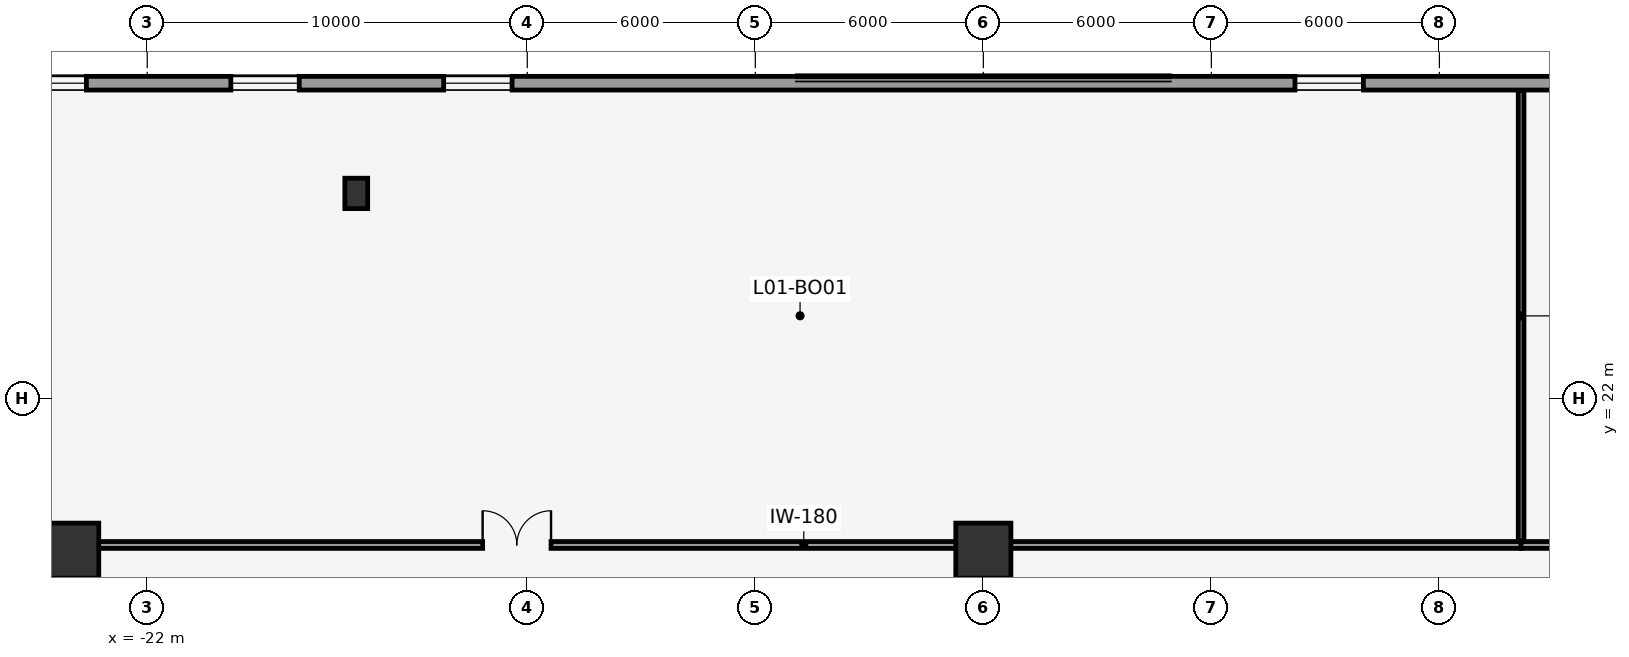
"""IFC4 building model, lengths in metres.
Left out: names, types, materials, properties, quantities, classifications, styles, units other than length and angle.
Written with IfcOpenShell. Run it as: python <this file> out.ifc"""

import sys

from ifc_helpers import new_model, si_unit, direction, frame, frame_2d, origin, origin_2d, place, context, subcontext, project, spatial, rectangle, hollow_rectangle, extrude, element, fill, save


model = new_model("IFC4")
c1 = context("Model", 3, precision=1e-05, world=origin(), true_north=direction((0.0, 1.0)))
c2 = subcontext(c1, "Body", "Model", "MODEL_VIEW")
j1 = project(units=[si_unit("LENGTHUNIT", "METRE"), si_unit("PLANEANGLEUNIT", "RADIAN")], contexts=[c1])
p1 = place(None, origin())
s1 = spatial("IfcSite", under=j1, at=p1, CompositionType="ELEMENT")
p2 = place(p1, origin())
s2 = spatial("IfcBuilding", under=s1, at=p2, CompositionType="ELEMENT")
p3 = place(p2, frame((0.0, 0.0, 6.0)))
s3 = spatial("IfcBuildingStorey", under=s2, at=p3, CompositionType="ELEMENT", Elevation=6.0)
for number, where, z_axis, x_axis in (
    (1, (-24.0, 18.0, 0.0), (0.0, 0.0, 1.0), (1.0, 0.0, 0.0)),
    (2, (0.0, 18.0, 0.0), (0.0, 0.0, 1.0), (1.0, 0.0, 0.0)),
):
    element("IfcColumn", number, at=place(p3, frame(where, z_axis=z_axis, x_axis=x_axis)), inside=s3, PredefinedType="COLUMN", context=c2, shape_type="SweptSolid", body=[
        extrude(rectangle(XDim=1.45, YDim=1.45, at=origin_2d()), origin(), (0.0, 0.0, 1.0), 5.5),
    ])
p4 = place(p3, frame((-16.5, 27.4, 0.0), z_axis=(0.0, 0.0, 1.0), x_axis=(1.0, 0.0, 0.0)))
e3 = element("IfcColumn", 3, at=p4, inside=s3, PredefinedType="COLUMN", context=c2, shape_type="SweptSolid", body=[
    extrude(hollow_rectangle(XDim=0.6, YDim=0.8, WallThickness=0.05, at=origin_2d()), origin(), (0.0, 0.0, 1.0), 5.5),
])
p5 = place(p3, frame((-41.3, 30.3, 0.0), z_axis=(0.0, 0.0, 1.0), x_axis=(1.0, 0.0, 0.0)))
e4 = element("IfcWall", 4, at=p5, inside=s3, PredefinedType="STANDARD", context=c2, shape_type="SweptSolid", body=[
    extrude(rectangle(XDim=82.6, YDim=0.36, at=frame_2d((41.3, 0.0))), origin(), (0.0, 0.0, 1.0), 5.2),
])
p6 = place(p5, frame((4.7, 0.0, 0.9)))
e5 = element("IfcOpeningElement", 5, at=p6, cuts=e4, PredefinedType="OPENING", context=c2, shape_type="SweptSolid", body=[
    extrude(rectangle(XDim=1.8, YDim=2.6, at=frame_2d((0.9, 1.3))), frame((0.0, 0.19, 0.0), z_axis=(0.0, -1.0, 0.0), x_axis=(1.0, 0.0, 0.0)), (0.0, 0.0, 1.0), 0.38),
])
p7 = place(p5, frame((10.3, 0.0, 0.9)))
e6 = element("IfcOpeningElement", 6, at=p7, cuts=e4, PredefinedType="OPENING", context=c2, shape_type="SweptSolid", body=[
    extrude(rectangle(XDim=1.8, YDim=2.6, at=frame_2d((0.9, 1.3))), frame((0.0, 0.19, 0.0), z_axis=(0.0, -1.0, 0.0), x_axis=(1.0, 0.0, 0.0)), (0.0, 0.0, 1.0), 0.38),
])
p8 = place(p5, frame((15.9, 0.0, 0.9)))
e7 = element("IfcOpeningElement", 7, at=p8, cuts=e4, PredefinedType="OPENING", context=c2, shape_type="SweptSolid", body=[
    extrude(rectangle(XDim=1.8, YDim=2.6, at=frame_2d((0.9, 1.3))), frame((0.0, 0.19, 0.0), z_axis=(0.0, -1.0, 0.0), x_axis=(1.0, 0.0, 0.0)), (0.0, 0.0, 1.0), 0.38),
])
p9 = place(p5, frame((21.5, 0.0, 0.9)))
e8 = element("IfcOpeningElement", 8, at=p9, cuts=e4, PredefinedType="OPENING", context=c2, shape_type="SweptSolid", body=[
    extrude(rectangle(XDim=1.8, YDim=2.6, at=frame_2d((0.9, 1.3))), frame((0.0, 0.19, 0.0), z_axis=(0.0, -1.0, 0.0), x_axis=(1.0, 0.0, 0.0)), (0.0, 0.0, 1.0), 0.38),
])
p10 = place(p5, frame((27.1, 0.0, 0.9)))
e9 = element("IfcOpeningElement", 9, at=p10, cuts=e4, PredefinedType="OPENING", context=c2, shape_type="SweptSolid", body=[
    extrude(rectangle(XDim=1.8, YDim=2.6, at=frame_2d((0.9, 1.3))), frame((0.0, 0.19, 0.0), z_axis=(0.0, -1.0, 0.0), x_axis=(1.0, 0.0, 0.0)), (0.0, 0.0, 1.0), 0.38),
])
p11 = place(p5, frame((49.5, 0.0, 0.9)))
e10 = element("IfcOpeningElement", 10, at=p11, cuts=e4, PredefinedType="OPENING", context=c2, shape_type="SweptSolid", body=[
    extrude(rectangle(XDim=1.8, YDim=2.6, at=frame_2d((0.9, 1.3))), frame((0.0, 0.19, 0.0), z_axis=(0.0, -1.0, 0.0), x_axis=(1.0, 0.0, 0.0)), (0.0, 0.0, 1.0), 0.38),
])
p12 = place(p5, frame((60.7, 0.0, 0.9)))
e11 = element("IfcOpeningElement", 11, at=p12, cuts=e4, PredefinedType="OPENING", context=c2, shape_type="SweptSolid", body=[
    extrude(rectangle(XDim=1.8, YDim=2.6, at=frame_2d((0.9, 1.3))), frame((0.0, 0.19, 0.0), z_axis=(0.0, -1.0, 0.0), x_axis=(1.0, 0.0, 0.0)), (0.0, 0.0, 1.0), 0.38),
])
p13 = place(p5, frame((66.3, 0.0, 0.9)))
e12 = element("IfcOpeningElement", 12, at=p13, cuts=e4, PredefinedType="OPENING", context=c2, shape_type="SweptSolid", body=[
    extrude(rectangle(XDim=1.8, YDim=2.6, at=frame_2d((0.9, 1.3))), frame((0.0, 0.19, 0.0), z_axis=(0.0, -1.0, 0.0), x_axis=(1.0, 0.0, 0.0)), (0.0, 0.0, 1.0), 0.38),
])
p14 = place(p5, frame((71.9, 0.0, 0.9)))
e13 = element("IfcOpeningElement", 13, at=p14, cuts=e4, PredefinedType="OPENING", context=c2, shape_type="SweptSolid", body=[
    extrude(rectangle(XDim=1.8, YDim=2.6, at=frame_2d((0.9, 1.3))), frame((0.0, 0.19, 0.0), z_axis=(0.0, -1.0, 0.0), x_axis=(1.0, 0.0, 0.0)), (0.0, 0.0, 1.0), 0.38),
])
p15 = place(p3, frame((-23.6, 18.15, 0.0), z_axis=(0.0, 0.0, 1.0), x_axis=(1.0, 0.0, 0.0)))
e14 = element("IfcWall", 14, at=p15, inside=s3, PredefinedType="PARTITIONING", context=c2, shape_type="SweptSolid", body=[
    extrude(rectangle(XDim=37.75, YDim=0.18, at=frame_2d((18.875, 0.0))), origin(), (0.0, 0.0, 1.0), 3.38),
])
p16 = place(p15, frame((10.425, 0.0, 0.0)))
e15 = element("IfcOpeningElement", 15, at=p16, cuts=e14, PredefinedType="OPENING", context=c2, shape_type="SweptSolid", body=[
    extrude(rectangle(XDim=1.8, YDim=2.2, at=frame_2d((0.9, 1.1))), frame((0.0, 0.1, 0.0), z_axis=(0.0, -1.0, 0.0), x_axis=(1.0, 0.0, 0.0)), (0.0, 0.0, 1.0), 0.2),
])
p17 = place(p3, frame((14.15, 18.15, 0.0), z_axis=(0.0, 0.0, 1.0), x_axis=(1.0, 0.0, 0.0)))
e16 = element("IfcWall", 16, at=p17, inside=s3, PredefinedType="PARTITIONING", context=c2, shape_type="SweptSolid", body=[
    extrude(rectangle(XDim=9.5, YDim=0.18, at=frame_2d((4.75, 0.0))), origin(), (0.0, 0.0, 1.0), 3.38),
])
p18 = place(p17, frame((4.275, 0.0, 0.0)))
e17 = element("IfcOpeningElement", 17, at=p18, cuts=e16, PredefinedType="OPENING", context=c2, shape_type="SweptSolid", body=[
    extrude(rectangle(XDim=0.95, YDim=2.15, at=frame_2d((0.475, 1.075))), frame((0.0, 0.1, 0.0), z_axis=(0.0, -1.0, 0.0), x_axis=(1.0, 0.0, 0.0)), (0.0, 0.0, 1.0), 0.2),
])
p19 = place(p3, frame((14.15, 18.25, 0.0), z_axis=(0.0, 0.0, 1.0), x_axis=(0.0, 1.0, 0.0)))
e18 = element("IfcWall", 18, at=p19, inside=s3, PredefinedType="PARTITIONING", context=c2, shape_type="SweptSolid", body=[
    extrude(rectangle(XDim=11.855, YDim=0.15, at=frame_2d((5.927, 0.0))), origin(), (0.0, 0.0, 1.0), 5.2),
])
p20 = place(p8, origin())
e19 = element("IfcWindow", 19, at=p20, inside=s3, PartitioningType="DOUBLE_PANEL_VERTICAL", PredefinedType="WINDOW", context=c2, shape_type="SweptSolid", body=[
    extrude(rectangle(XDim=1.8, YDim=2.6, at=frame_2d((0.9, 1.3))), frame((0.0, 0.03, 0.0), z_axis=(0.0, -1.0, 0.0), x_axis=(1.0, 0.0, 0.0)), (0.0, 0.0, 1.0), 0.06),
])
fill(e7, e19)
p21 = place(p9, origin())
e20 = element("IfcWindow", 20, at=p21, inside=s3, PartitioningType="DOUBLE_PANEL_VERTICAL", PredefinedType="WINDOW", context=c2, shape_type="SweptSolid", body=[
    extrude(rectangle(XDim=1.8, YDim=2.6, at=frame_2d((0.9, 1.3))), frame((0.0, 0.03, 0.0), z_axis=(0.0, -1.0, 0.0), x_axis=(1.0, 0.0, 0.0)), (0.0, 0.0, 1.0), 0.06),
])
fill(e8, e20)
p22 = place(p10, origin())
e21 = element("IfcWindow", 21, at=p22, inside=s3, PartitioningType="DOUBLE_PANEL_VERTICAL", PredefinedType="WINDOW", context=c2, shape_type="SweptSolid", body=[
    extrude(rectangle(XDim=1.8, YDim=2.6, at=frame_2d((0.9, 1.3))), frame((0.0, 0.03, 0.0), z_axis=(0.0, -1.0, 0.0), x_axis=(1.0, 0.0, 0.0)), (0.0, 0.0, 1.0), 0.06),
])
fill(e9, e21)
p23 = place(p11, origin())
e22 = element("IfcWindow", 22, at=p23, inside=s3, PartitioningType="DOUBLE_PANEL_VERTICAL", PredefinedType="WINDOW", context=c2, shape_type="SweptSolid", body=[
    extrude(rectangle(XDim=1.8, YDim=2.6, at=frame_2d((0.9, 1.3))), frame((0.0, 0.03, 0.0), z_axis=(0.0, -1.0, 0.0), x_axis=(1.0, 0.0, 0.0)), (0.0, 0.0, 1.0), 0.06),
])
fill(e10, e22)
p24 = place(p16, origin())
e23 = element("IfcDoor", 23, at=p24, inside=s3, OperationType="DOUBLE_DOOR_SINGLE_SWING", PredefinedType="DOOR", context=c2, shape_type="SweptSolid", body=[
    extrude(rectangle(XDim=1.8, YDim=2.2, at=frame_2d((0.9, 1.1))), frame((0.0, 0.025, 0.0), z_axis=(0.0, -1.0, 0.0), x_axis=(1.0, 0.0, 0.0)), (0.0, 0.0, 1.0), 0.05),
])
fill(e15, e23)
save(model, sys.argv[1])
